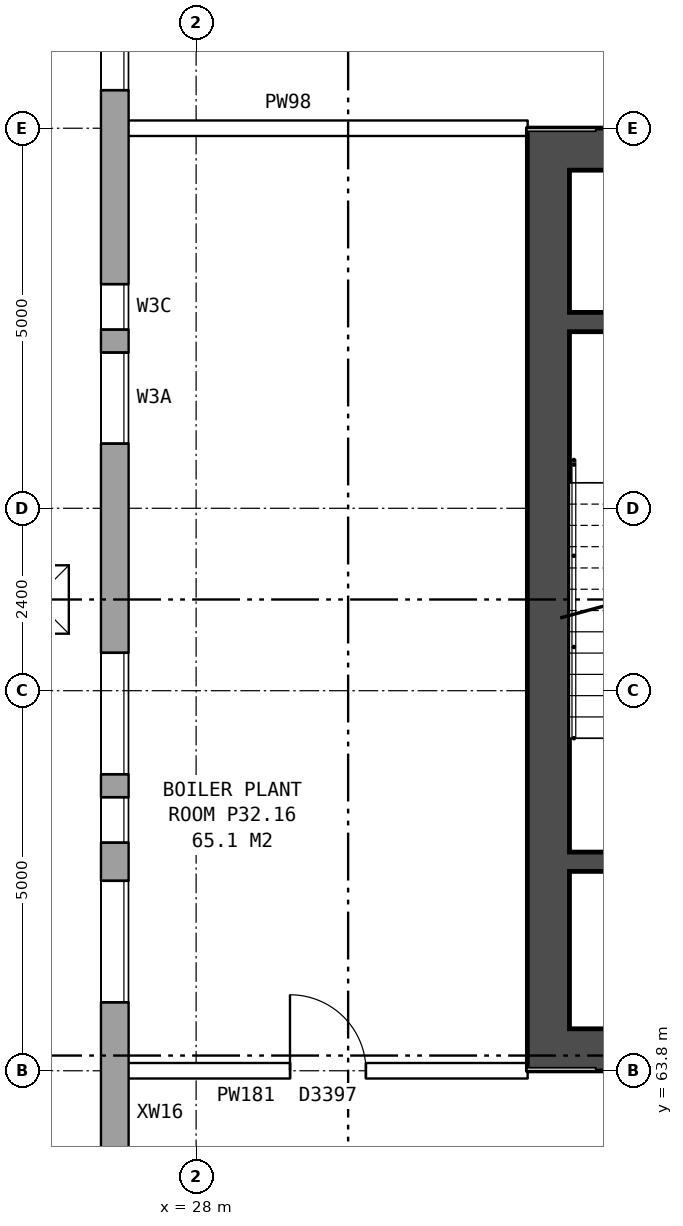
"""IFC4 building model, lengths in metres.
Left out: names, types, materials, properties, quantities, classifications, styles, units other than length and angle.
Written with IfcOpenShell. Run it as: python <this file> out.ifc"""

import sys

from ifc_helpers import new_model, si_unit, direction, frame, frame_2d, origin, origin_2d, place, context, subcontext, project, spatial, rectangle, extrude, element, fill, save


model = new_model("IFC4")
c1 = context("Model", 3, precision=1e-05, world=origin(), true_north=direction((0.0, 1.0)))
c2 = subcontext(c1, "Body", "Model", "MODEL_VIEW")
j1 = project(units=[si_unit("LENGTHUNIT", "METRE"), si_unit("PLANEANGLEUNIT", "RADIAN")], contexts=[c1])
p1 = place(None, origin())
s1 = spatial("IfcSite", under=j1, at=p1, CompositionType="ELEMENT")
p2 = place(p1, origin())
s2 = spatial("IfcBuilding", under=s1, at=p2, CompositionType="ELEMENT")
p3 = place(p2, frame((0.0, 0.0, 115.0)))
s3 = spatial("IfcBuildingStorey", under=s2, at=p3, CompositionType="ELEMENT", Elevation=115.0)
p4 = place(p3, frame((26.93, 82.925, 0.0), z_axis=(0.0, 0.0, 1.0), x_axis=(0.0, -1.0, 0.0)))
e1 = element("IfcWall", 1, at=p4, inside=s3, PredefinedType="STANDARD", context=c2, shape_type="SweptSolid", body=[
    extrude(rectangle(XDim=25.851, YDim=0.36, at=frame_2d((12.925, 0.0))), origin(), (0.0, 0.0, 1.0), 4.2),
])
p5 = place(p4, frame((1.625, 0.0, 1.5)))
e2 = element("IfcOpeningElement", 2, at=p5, cuts=e1, PredefinedType="OPENING", context=c2, shape_type="SweptSolid", body=[
    extrude(rectangle(XDim=1.6, YDim=1.2, at=frame_2d((0.8, 0.6))), frame((0.0, 0.19, 0.0), z_axis=(0.0, -1.0, 0.0), x_axis=(1.0, 0.0, 0.0)), (0.0, 0.0, 1.0), 0.38),
])
p6 = place(p4, frame((4.625, 0.0, 1.5)))
e3 = element("IfcOpeningElement", 3, at=p6, cuts=e1, PredefinedType="OPENING", context=c2, shape_type="SweptSolid", body=[
    extrude(rectangle(XDim=1.6, YDim=1.2, at=frame_2d((0.8, 0.6))), frame((0.0, 0.19, 0.0), z_axis=(0.0, -1.0, 0.0), x_axis=(1.0, 0.0, 0.0)), (0.0, 0.0, 1.0), 0.38),
])
p7 = place(p4, frame((8.775, 0.0, 1.5)))
e4 = element("IfcOpeningElement", 4, at=p7, cuts=e1, PredefinedType="OPENING", context=c2, shape_type="SweptSolid", body=[
    extrude(rectangle(XDim=0.6, YDim=1.2, at=frame_2d((0.3, 0.6))), frame((0.0, 0.19, 0.0), z_axis=(0.0, -1.0, 0.0), x_axis=(1.0, 0.0, 0.0)), (0.0, 0.0, 1.0), 0.38),
])
p8 = place(p4, frame((9.675, 0.0, 1.5)))
e5 = element("IfcOpeningElement", 5, at=p8, cuts=e1, PredefinedType="OPENING", context=c2, shape_type="SweptSolid", body=[
    extrude(rectangle(XDim=1.2, YDim=1.2, at=frame_2d((0.6, 0.6))), frame((0.0, 0.19, 0.0), z_axis=(0.0, -1.0, 0.0), x_axis=(1.0, 0.0, 0.0)), (0.0, 0.0, 1.0), 0.38),
])
p9 = place(p4, frame((13.625, 0.0, 1.5)))
e6 = element("IfcOpeningElement", 6, at=p9, cuts=e1, PredefinedType="OPENING", context=c2, shape_type="SweptSolid", body=[
    extrude(rectangle(XDim=1.6, YDim=1.2, at=frame_2d((0.8, 0.6))), frame((0.0, 0.19, 0.0), z_axis=(0.0, -1.0, 0.0), x_axis=(1.0, 0.0, 0.0)), (0.0, 0.0, 1.0), 0.38),
])
p10 = place(p4, frame((16.625, 0.0, 1.5)))
e7 = element("IfcOpeningElement", 7, at=p10, cuts=e1, PredefinedType="OPENING", context=c2, shape_type="SweptSolid", body=[
    extrude(rectangle(XDim=1.6, YDim=1.2, at=frame_2d((0.8, 0.6))), frame((0.0, 0.19, 0.0), z_axis=(0.0, -1.0, 0.0), x_axis=(1.0, 0.0, 0.0)), (0.0, 0.0, 1.0), 0.38),
])
p11 = place(p4, frame((21.125, 0.0, 1.5)))
e8 = element("IfcOpeningElement", 8, at=p11, cuts=e1, PredefinedType="OPENING", context=c2, shape_type="SweptSolid", body=[
    extrude(rectangle(XDim=0.6, YDim=1.2, at=frame_2d((0.3, 0.6))), frame((0.0, 0.19, 0.0), z_axis=(0.0, -1.0, 0.0), x_axis=(1.0, 0.0, 0.0)), (0.0, 0.0, 1.0), 0.38),
])
p12 = place(p4, frame((22.325, 0.0, 1.5)))
e9 = element("IfcOpeningElement", 9, at=p12, cuts=e1, PredefinedType="OPENING", context=c2, shape_type="SweptSolid", body=[
    extrude(rectangle(XDim=0.9, YDim=1.2, at=frame_2d((0.45, 0.6))), frame((0.0, 0.19, 0.0), z_axis=(0.0, -1.0, 0.0), x_axis=(1.0, 0.0, 0.0)), (0.0, 0.0, 1.0), 0.38),
])
p13 = place(p4, frame((15.525, 0.0, 1.5)))
e10 = element("IfcOpeningElement", 10, at=p13, cuts=e1, PredefinedType="OPENING", context=c2, shape_type="SweptSolid", body=[
    extrude(rectangle(XDim=0.6, YDim=1.2, at=frame_2d((0.3, 0.6))), frame((0.0, 0.19, 0.0), z_axis=(0.0, -1.0, 0.0), x_axis=(1.0, 0.0, 0.0)), (0.0, 0.0, 1.0), 0.38),
])
p14 = place(p3, frame((32.635, 76.2, 0.0), z_axis=(0.0, 0.0, 1.0), x_axis=(0.0, -1.0, 0.0)))
e11 = element("IfcWall", 11, at=p14, inside=s3, PredefinedType="SHEAR", context=c2, shape_type="SweptSolid", body=[
    extrude(rectangle(XDim=12.4, YDim=0.55, at=frame_2d((6.2, 0.0))), origin(), (0.0, 0.0, 1.0), 4.2),
])
for number, where, z_axis, x_axis in (
    (12, (40.81, 75.925, 0.0), (0.0, 0.0, 1.0), (-1.0, 0.0, 0.0)),
    (13, (40.81, 64.075, 0.0), (0.0, 0.0, 1.0), (-1.0, 0.0, 0.0)),
):
    element("IfcWall", number, at=place(p3, frame(where, z_axis=z_axis, x_axis=x_axis)), inside=s3, PredefinedType="SHEAR", context=c2, shape_type="SweptSolid", body=[
        extrude(rectangle(XDim=7.9, YDim=0.55, at=frame_2d((3.95, 0.0))), origin(), (0.0, 0.0, 1.0), 4.2),
    ])
for number, where, z_axis, x_axis in (
    (14, (35.985, 73.65, 0.0), (0.0, 0.0, 1.0), (-1.0, 0.0, 0.0)),
    (15, (35.985, 66.55, 0.0), (0.0, 0.0, 1.0), (-1.0, 0.0, 0.0)),
):
    element("IfcWall", number, at=place(p3, frame(where, z_axis=z_axis, x_axis=x_axis)), inside=s3, PredefinedType="SHEAR", context=c2, shape_type="SweptSolid", body=[
        extrude(rectangle(XDim=3.075, YDim=0.25, at=frame_2d((1.538, 0.0))), origin(), (0.0, 0.0, 1.0), 4.2),
    ])
p15 = place(p3, frame((26.99, 63.8, 0.0), z_axis=(0.0, 0.0, 1.0), x_axis=(1.0, 0.0, 0.0)))
e16 = element("IfcWall", 16, at=p15, inside=s3, PredefinedType="PARTITIONING", context=c2, shape_type="SweptSolid", body=[
    extrude(rectangle(XDim=5.37, YDim=0.2, at=frame_2d((2.685, 0.0))), origin(), (0.0, 0.0, 1.0), 4.2),
])
p16 = place(p15, frame((2.245, 0.0, 0.0)))
e17 = element("IfcOpeningElement", 17, at=p16, cuts=e16, PredefinedType="OPENING", context=c2, shape_type="SweptSolid", body=[
    extrude(rectangle(XDim=1.0, YDim=2.1, at=frame_2d((0.5, 1.05))), frame((0.0, 0.11, 0.0), z_axis=(0.0, -1.0, 0.0), x_axis=(1.0, 0.0, 0.0)), (0.0, 0.0, 1.0), 0.22),
])
p17 = place(p3, frame((26.99, 76.2, 0.0), z_axis=(0.0, 0.0, 1.0), x_axis=(1.0, 0.0, 0.0)))
e18 = element("IfcWall", 18, at=p17, inside=s3, PredefinedType="PARTITIONING", context=c2, shape_type="SweptSolid", body=[
    extrude(rectangle(XDim=5.37, YDim=0.2, at=frame_2d((2.685, 0.0))), origin(), (0.0, 0.0, 1.0), 4.2),
])
p18 = place(p6, origin())
e19 = element("IfcWindow", 19, at=p18, inside=s3, PartitioningType="DOUBLE_PANEL_HORIZONTAL", PredefinedType="WINDOW", context=c2, shape_type="SweptSolid", body=[
    extrude(rectangle(XDim=1.6, YDim=1.2, at=frame_2d((0.8, 0.6))), frame((0.0, 0.15, 0.0), z_axis=(0.0, -1.0, 0.0), x_axis=(1.0, 0.0, 0.0)), (0.0, 0.0, 1.0), 0.06),
])
fill(e3, e19)
p19 = place(p7, origin())
e20 = element("IfcWindow", 20, at=p19, inside=s3, PartitioningType="DOUBLE_PANEL_HORIZONTAL", PredefinedType="WINDOW", context=c2, shape_type="SweptSolid", body=[
    extrude(rectangle(XDim=0.6, YDim=1.2, at=frame_2d((0.3, 0.6))), frame((0.0, 0.15, 0.0), z_axis=(0.0, -1.0, 0.0), x_axis=(1.0, 0.0, 0.0)), (0.0, 0.0, 1.0), 0.06),
])
fill(e4, e20)
p20 = place(p8, origin())
e21 = element("IfcWindow", 21, at=p20, inside=s3, PartitioningType="DOUBLE_PANEL_HORIZONTAL", PredefinedType="WINDOW", context=c2, shape_type="SweptSolid", body=[
    extrude(rectangle(XDim=1.2, YDim=1.2, at=frame_2d((0.6, 0.6))), frame((0.0, 0.15, 0.0), z_axis=(0.0, -1.0, 0.0), x_axis=(1.0, 0.0, 0.0)), (0.0, 0.0, 1.0), 0.06),
])
fill(e5, e21)
p21 = place(p9, origin())
e22 = element("IfcWindow", 22, at=p21, inside=s3, PartitioningType="DOUBLE_PANEL_HORIZONTAL", PredefinedType="WINDOW", context=c2, shape_type="SweptSolid", body=[
    extrude(rectangle(XDim=1.6, YDim=1.2, at=frame_2d((0.8, 0.6))), frame((0.0, 0.15, 0.0), z_axis=(0.0, -1.0, 0.0), x_axis=(1.0, 0.0, 0.0)), (0.0, 0.0, 1.0), 0.06),
])
fill(e6, e22)
p22 = place(p10, origin())
e23 = element("IfcWindow", 23, at=p22, inside=s3, PartitioningType="DOUBLE_PANEL_HORIZONTAL", PredefinedType="WINDOW", context=c2, shape_type="SweptSolid", body=[
    extrude(rectangle(XDim=1.6, YDim=1.2, at=frame_2d((0.8, 0.6))), frame((0.0, 0.15, 0.0), z_axis=(0.0, -1.0, 0.0), x_axis=(1.0, 0.0, 0.0)), (0.0, 0.0, 1.0), 0.06),
])
fill(e7, e23)
p23 = place(p3, frame((0.0, 0.0, -0.25)))
p24 = place(p23, frame((25.875, 70.0, 0.0)))
p25 = place(p24, frame((0.0, 0.0, 0.2)))
e24 = element("IfcWindow", 24, at=p25, inside=s3, PartitioningType="SINGLE_PANEL", PredefinedType="SKYLIGHT", context=c2, shape_type="SweptSolid", body=[
    extrude(rectangle(XDim=0.9, YDim=0.9, at=origin_2d()), origin(), (0.0, 0.0, 1.0), 0.05),
])
p26 = place(p16, origin())
e25 = element("IfcDoor", 25, at=p26, inside=s3, OperationType="SINGLE_SWING_LEFT", PredefinedType="DOOR", context=c2, shape_type="SweptSolid", body=[
    extrude(rectangle(XDim=1.0, YDim=2.1, at=frame_2d((0.5, 1.05))), frame((0.0, 0.025, 0.0), z_axis=(0.0, -1.0, 0.0), x_axis=(1.0, 0.0, 0.0)), (0.0, 0.0, 1.0), 0.05),
])
fill(e17, e25)
p27 = place(p13, origin())
e26 = element("IfcWindow", 26, at=p27, inside=s3, PartitioningType="DOUBLE_PANEL_HORIZONTAL", PredefinedType="WINDOW", context=c2, shape_type="SweptSolid", body=[
    extrude(rectangle(XDim=0.6, YDim=1.2, at=frame_2d((0.3, 0.6))), frame((0.0, 0.15, 0.0), z_axis=(0.0, -1.0, 0.0), x_axis=(1.0, 0.0, 0.0)), (0.0, 0.0, 1.0), 0.06),
])
fill(e10, e26)
save(model, sys.argv[1])
